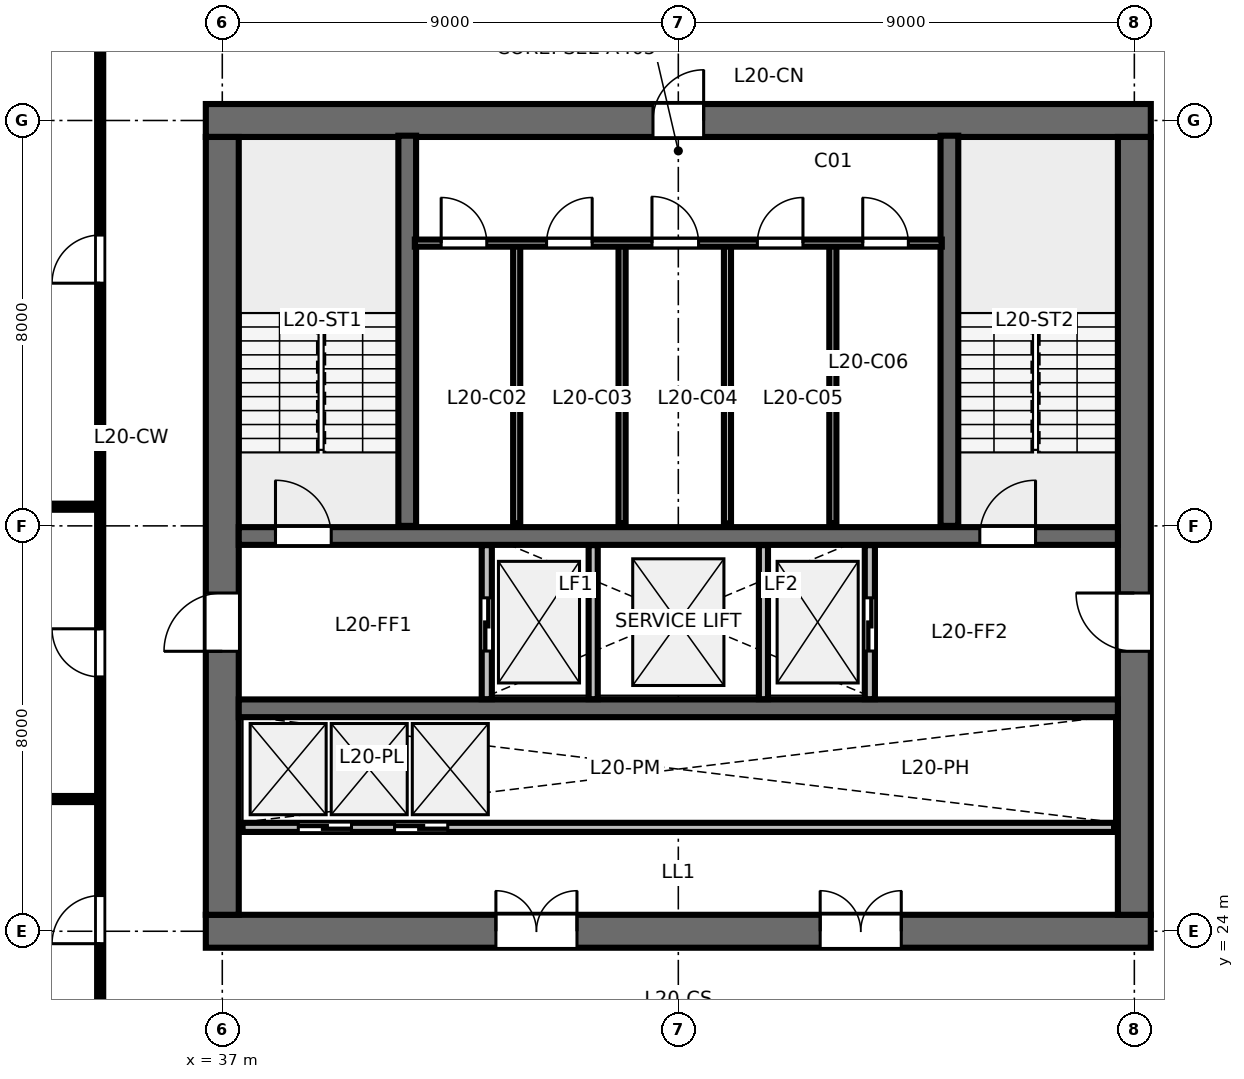
"""IFC4 building model, lengths in metres.
Left out: names, types, materials, properties, quantities, classifications, styles, units other than length and angle.
Written with IfcOpenShell. Run it as: python <this file> out.ifc"""

import sys

from ifc_helpers import new_model, si_unit, direction, frame, frame_2d, origin, place, context, subcontext, project, spatial, rectangle, extrude, element, fill, save


model = new_model("IFC4")
c1 = context("Model", 3, precision=1e-05, world=origin(), true_north=direction((0.0, 1.0)))
c2 = subcontext(c1, "Body", "Model", "MODEL_VIEW")
j1 = project(units=[si_unit("LENGTHUNIT", "METRE"), si_unit("PLANEANGLEUNIT", "RADIAN")], contexts=[c1])
p1 = place(None, origin())
s1 = spatial("IfcSite", under=j1, at=p1, CompositionType="ELEMENT")
p2 = place(p1, origin())
s2 = spatial("IfcBuilding", under=s1, at=p2, CompositionType="ELEMENT")
p3 = place(p2, frame((0.0, 0.0, 78.4)))
s3 = spatial("IfcBuildingStorey", under=s2, at=p3, CompositionType="ELEMENT", Elevation=78.4)
p4 = place(p3, frame((36.675, 24.0, 0.0), z_axis=(0.0, 0.0, 1.0), x_axis=(1.0, 0.0, 0.0)))
e1 = element("IfcWall", 1, at=p4, inside=s3, PredefinedType="SHEAR", context=c2, shape_type="SweptSolid", body=[
    extrude(rectangle(XDim=18.65, YDim=0.65, at=frame_2d((9.325, 0.0))), origin(), (0.0, 0.0, 1.0), 3.36),
])
p5 = place(p4, frame((5.725, 0.0, 0.0)))
e2 = element("IfcOpeningElement", 2, at=p5, cuts=e1, PredefinedType="OPENING", context=c2, shape_type="SweptSolid", body=[
    extrude(rectangle(XDim=1.6, YDim=2.15, at=frame_2d((0.8, 1.075))), frame((0.0, 0.335, 0.0), z_axis=(0.0, -1.0, 0.0), x_axis=(1.0, 0.0, 0.0)), (0.0, 0.0, 1.0), 0.67),
])
p6 = place(p4, frame((12.125, 0.0, 0.0)))
e3 = element("IfcOpeningElement", 3, at=p6, cuts=e1, PredefinedType="OPENING", context=c2, shape_type="SweptSolid", body=[
    extrude(rectangle(XDim=1.6, YDim=2.15, at=frame_2d((0.8, 1.075))), frame((0.0, 0.335, 0.0), z_axis=(0.0, -1.0, 0.0), x_axis=(1.0, 0.0, 0.0)), (0.0, 0.0, 1.0), 0.67),
])
p7 = place(p3, frame((36.675, 40.0, 0.0), z_axis=(0.0, 0.0, 1.0), x_axis=(1.0, 0.0, 0.0)))
e4 = element("IfcWall", 4, at=p7, inside=s3, PredefinedType="SHEAR", context=c2, shape_type="SweptSolid", body=[
    extrude(rectangle(XDim=18.65, YDim=0.65, at=frame_2d((9.325, 0.0))), origin(), (0.0, 0.0, 1.0), 3.36),
])
p8 = place(p7, frame((8.825, 0.0, 0.0)))
e5 = element("IfcOpeningElement", 5, at=p8, cuts=e4, PredefinedType="OPENING", context=c2, shape_type="SweptSolid", body=[
    extrude(rectangle(XDim=1.0, YDim=2.15, at=frame_2d((0.5, 1.075))), frame((0.0, 0.335, 0.0), z_axis=(0.0, -1.0, 0.0), x_axis=(1.0, 0.0, 0.0)), (0.0, 0.0, 1.0), 0.67),
])
p9 = place(p3, frame((37.0, 24.325, 0.0), z_axis=(0.0, 0.0, 1.0), x_axis=(0.0, 1.0, 0.0)))
e6 = element("IfcWall", 6, at=p9, inside=s3, PredefinedType="SHEAR", context=c2, shape_type="SweptSolid", body=[
    extrude(rectangle(XDim=15.35, YDim=0.65, at=frame_2d((7.675, 0.0))), origin(), (0.0, 0.0, 1.0), 3.36),
])
p10 = place(p9, frame((5.2, 0.0, 0.0)))
e7 = element("IfcOpeningElement", 7, at=p10, cuts=e6, PredefinedType="OPENING", context=c2, shape_type="SweptSolid", body=[
    extrude(rectangle(XDim=1.15, YDim=2.15, at=frame_2d((0.575, 1.075))), frame((0.0, 0.335, 0.0), z_axis=(0.0, -1.0, 0.0), x_axis=(1.0, 0.0, 0.0)), (0.0, 0.0, 1.0), 0.67),
])
p11 = place(p3, frame((55.0, 24.325, 0.0), z_axis=(0.0, 0.0, 1.0), x_axis=(0.0, 1.0, 0.0)))
e8 = element("IfcWall", 8, at=p11, inside=s3, PredefinedType="SHEAR", context=c2, shape_type="SweptSolid", body=[
    extrude(rectangle(XDim=15.35, YDim=0.65, at=frame_2d((7.675, 0.0))), origin(), (0.0, 0.0, 1.0), 3.36),
])
p12 = place(p11, frame((5.2, 0.0, 0.0)))
e9 = element("IfcOpeningElement", 9, at=p12, cuts=e8, PredefinedType="OPENING", context=c2, shape_type="SweptSolid", body=[
    extrude(rectangle(XDim=1.15, YDim=2.15, at=frame_2d((0.575, 1.075))), frame((0.0, 0.335, 0.0), z_axis=(0.0, -1.0, 0.0), x_axis=(1.0, 0.0, 0.0)), (0.0, 0.0, 1.0), 0.67),
])
p13 = place(p3, frame((37.325, 31.8, 0.0), z_axis=(0.0, 0.0, 1.0), x_axis=(1.0, 0.0, 0.0)))
e10 = element("IfcWall", 10, at=p13, inside=s3, PredefinedType="SHEAR", context=c2, shape_type="SweptSolid", body=[
    extrude(rectangle(XDim=17.35, YDim=0.35, at=frame_2d((8.675, 0.0))), origin(), (0.0, 0.0, 1.0), 3.36),
])
p14 = place(p13, frame((0.725, 0.0, 0.0)))
e11 = element("IfcOpeningElement", 11, at=p14, cuts=e10, PredefinedType="OPENING", context=c2, shape_type="SweptSolid", body=[
    extrude(rectangle(XDim=1.1, YDim=2.15, at=frame_2d((0.55, 1.075))), frame((0.0, 0.185, 0.0), z_axis=(0.0, -1.0, 0.0), x_axis=(1.0, 0.0, 0.0)), (0.0, 0.0, 1.0), 0.37),
])
p15 = place(p13, frame((14.625, 0.0, 0.0)))
e12 = element("IfcOpeningElement", 12, at=p15, cuts=e10, PredefinedType="OPENING", context=c2, shape_type="SweptSolid", body=[
    extrude(rectangle(XDim=1.1, YDim=2.15, at=frame_2d((0.55, 1.075))), frame((0.0, 0.185, 0.0), z_axis=(0.0, -1.0, 0.0), x_axis=(1.0, 0.0, 0.0)), (0.0, 0.0, 1.0), 0.37),
])
p16 = place(p3, frame((37.325, 28.4, 0.0), z_axis=(0.0, 0.0, 1.0), x_axis=(1.0, 0.0, 0.0)))
e13 = element("IfcWall", 13, at=p16, inside=s3, PredefinedType="SHEAR", context=c2, shape_type="SweptSolid", body=[
    extrude(rectangle(XDim=17.35, YDim=0.35, at=frame_2d((8.675, 0.0))), origin(), (0.0, 0.0, 1.0), 3.36),
])
for number, where, z_axis, x_axis in (
    (14, (40.65, 32.0, 0.0), (0.0, 0.0, 1.0), (0.0, 1.0, 0.0)),
    (15, (51.35, 32.0, 0.0), (0.0, 0.0, 1.0), (0.0, 1.0, 0.0)),
):
    element("IfcWall", number, at=place(p3, frame(where, z_axis=z_axis, x_axis=x_axis)), inside=s3, PredefinedType="SHEAR", context=c2, shape_type="SweptSolid", body=[
        extrude(rectangle(XDim=7.7, YDim=0.35, at=frame_2d((3.85, 0.0))), origin(), (0.0, 0.0, 1.0), 3.6),
    ])
for number, where, z_axis, x_axis in (
    (16, (42.81, 32.05, 0.0), (0.0, 0.0, 1.0), (0.0, 1.0, 0.0)),
    (17, (44.89, 32.05, 0.0), (0.0, 0.0, 1.0), (0.0, 1.0, 0.0)),
    (18, (46.97, 32.05, 0.0), (0.0, 0.0, 1.0), (0.0, 1.0, 0.0)),
    (19, (49.05, 32.05, 0.0), (0.0, 0.0, 1.0), (0.0, 1.0, 0.0)),
):
    element("IfcWall", number, at=place(p3, frame(where, z_axis=z_axis, x_axis=x_axis)), inside=s3, PredefinedType="PARTITIONING", context=c2, shape_type="SweptSolid", body=[
        extrude(rectangle(XDim=5.5, YDim=0.14, at=frame_2d((2.75, 0.0))), origin(), (0.0, 0.0, 1.0), 3.36),
    ])
p17 = place(p3, frame((40.8, 37.58, 0.0), z_axis=(0.0, 0.0, 1.0), x_axis=(1.0, 0.0, 0.0)))
e20 = element("IfcWall", 20, at=p17, inside=s3, PredefinedType="PARTITIONING", context=c2, shape_type="SweptSolid", body=[
    extrude(rectangle(XDim=10.4, YDim=0.14, at=frame_2d((5.2, 0.0))), origin(), (0.0, 0.0, 1.0), 3.36),
])
p18 = place(p17, frame((0.52, 0.0, 0.0)))
e21 = element("IfcOpeningElement", 21, at=p18, cuts=e20, PredefinedType="OPENING", context=c2, shape_type="SweptSolid", body=[
    extrude(rectangle(XDim=0.9, YDim=2.15, at=frame_2d((0.45, 1.075))), frame((0.0, 0.08, 0.0), z_axis=(0.0, -1.0, 0.0), x_axis=(1.0, 0.0, 0.0)), (0.0, 0.0, 1.0), 0.16),
])
p19 = place(p17, frame((2.6, 0.0, 0.0)))
e22 = element("IfcOpeningElement", 22, at=p19, cuts=e20, PredefinedType="OPENING", context=c2, shape_type="SweptSolid", body=[
    extrude(rectangle(XDim=0.9, YDim=2.15, at=frame_2d((0.45, 1.075))), frame((0.0, 0.08, 0.0), z_axis=(0.0, -1.0, 0.0), x_axis=(1.0, 0.0, 0.0)), (0.0, 0.0, 1.0), 0.16),
])
p20 = place(p17, frame((4.68, 0.0, 0.0)))
e23 = element("IfcOpeningElement", 23, at=p20, cuts=e20, PredefinedType="OPENING", context=c2, shape_type="SweptSolid", body=[
    extrude(rectangle(XDim=0.92, YDim=2.15, at=frame_2d((0.46, 1.075))), frame((0.0, 0.08, 0.0), z_axis=(0.0, -1.0, 0.0), x_axis=(1.0, 0.0, 0.0)), (0.0, 0.0, 1.0), 0.16),
])
p21 = place(p17, frame((6.76, 0.0, 0.0)))
e24 = element("IfcOpeningElement", 24, at=p21, cuts=e20, PredefinedType="OPENING", context=c2, shape_type="SweptSolid", body=[
    extrude(rectangle(XDim=0.9, YDim=2.15, at=frame_2d((0.45, 1.075))), frame((0.0, 0.08, 0.0), z_axis=(0.0, -1.0, 0.0), x_axis=(1.0, 0.0, 0.0)), (0.0, 0.0, 1.0), 0.16),
])
p22 = place(p17, frame((8.84, 0.0, 0.0)))
e25 = element("IfcOpeningElement", 25, at=p22, cuts=e20, PredefinedType="OPENING", context=c2, shape_type="SweptSolid", body=[
    extrude(rectangle(XDim=0.9, YDim=2.15, at=frame_2d((0.45, 1.075))), frame((0.0, 0.08, 0.0), z_axis=(0.0, -1.0, 0.0), x_axis=(1.0, 0.0, 0.0)), (0.0, 0.0, 1.0), 0.16),
])
p23 = place(p3, frame((42.22, 28.58, 0.0), z_axis=(0.0, 0.0, 1.0), x_axis=(0.0, 1.0, 0.0)))
e26 = element("IfcWall", 26, at=p23, inside=s3, PredefinedType="PARTITIONING", context=c2, shape_type="SweptSolid", body=[
    extrude(rectangle(XDim=3.04, YDim=0.2, at=frame_2d((1.52, 0.0))), origin(), (0.0, 0.0, 1.0), 3.36),
])
p24 = place(p23, frame((0.95, 0.0, 0.0)))
e27 = element("IfcOpeningElement", 27, at=p24, cuts=e26, PredefinedType="OPENING", context=c2, shape_type="SweptSolid", body=[
    extrude(rectangle(XDim=1.05, YDim=2.15, at=frame_2d((0.525, 1.075))), frame((0.0, 0.11, 0.0), z_axis=(0.0, -1.0, 0.0), x_axis=(1.0, 0.0, 0.0)), (0.0, 0.0, 1.0), 0.22),
])
p25 = place(p3, frame((49.78, 28.58, 0.0), z_axis=(0.0, 0.0, 1.0), x_axis=(0.0, 1.0, 0.0)))
e28 = element("IfcWall", 28, at=p25, inside=s3, PredefinedType="PARTITIONING", context=c2, shape_type="SweptSolid", body=[
    extrude(rectangle(XDim=3.04, YDim=0.2, at=frame_2d((1.52, 0.0))), origin(), (0.0, 0.0, 1.0), 3.36),
])
p26 = place(p25, frame((0.95, 0.0, 0.0)))
e29 = element("IfcOpeningElement", 29, at=p26, cuts=e28, PredefinedType="OPENING", context=c2, shape_type="SweptSolid", body=[
    extrude(rectangle(XDim=1.05, YDim=2.15, at=frame_2d((0.525, 1.075))), frame((0.0, 0.11, 0.0), z_axis=(0.0, -1.0, 0.0), x_axis=(1.0, 0.0, 0.0)), (0.0, 0.0, 1.0), 0.22),
])
for number, where, z_axis, x_axis in (
    (30, (44.32, 28.58, 0.0), (0.0, 0.0, 1.0), (0.0, 1.0, 0.0)),
    (31, (47.68, 28.58, 0.0), (0.0, 0.0, 1.0), (0.0, 1.0, 0.0)),
):
    element("IfcWall", number, at=place(p3, frame(where, z_axis=z_axis, x_axis=x_axis)), inside=s3, PredefinedType="PARTITIONING", context=c2, shape_type="SweptSolid", body=[
        extrude(rectangle(XDim=3.04, YDim=0.18, at=frame_2d((1.52, 0.0))), origin(), (0.0, 0.0, 1.0), 3.36),
    ])
p27 = place(p3, frame((37.4, 26.05, 0.0), z_axis=(0.0, 0.0, 1.0), x_axis=(1.0, 0.0, 0.0)))
e32 = element("IfcWall", 32, at=p27, inside=s3, PredefinedType="PARTITIONING", context=c2, shape_type="SweptSolid", body=[
    extrude(rectangle(XDim=17.2, YDim=0.18, at=frame_2d((8.6, 0.0))), origin(), (0.0, 0.0, 1.0), 3.36),
])
p28 = place(p27, frame((1.1, 0.0, 0.0)))
e33 = element("IfcOpeningElement", 33, at=p28, cuts=e32, PredefinedType="OPENING", context=c2, shape_type="SweptSolid", body=[
    extrude(rectangle(XDim=1.05, YDim=2.15, at=frame_2d((0.525, 1.075))), frame((0.0, 0.1, 0.0), z_axis=(0.0, -1.0, 0.0), x_axis=(1.0, 0.0, 0.0)), (0.0, 0.0, 1.0), 0.2),
])
p29 = place(p27, frame((3.0, 0.0, 0.0)))
e34 = element("IfcOpeningElement", 34, at=p29, cuts=e32, PredefinedType="OPENING", context=c2, shape_type="SweptSolid", body=[
    extrude(rectangle(XDim=1.05, YDim=2.15, at=frame_2d((0.525, 1.075))), frame((0.0, 0.1, 0.0), z_axis=(0.0, -1.0, 0.0), x_axis=(1.0, 0.0, 0.0)), (0.0, 0.0, 1.0), 0.2),
])
p30 = place(p3, frame((34.59, 26.61, 0.0), z_axis=(0.0, 0.0, 1.0), x_axis=(-1.0, 0.0, 0.0)))
e35 = element("IfcWall", 35, at=p30, inside=s3, PredefinedType="PARTITIONING", context=c2, shape_type="SweptSolid", body=[
    extrude(rectangle(XDim=13.41, YDim=0.12, at=frame_2d((6.705, 0.0))), origin(), (0.0, 0.0, 1.0), 2.64),
])
p31 = place(p30, frame((1.4, 0.0, 0.0)))
e36 = element("IfcOpeningElement", 36, at=p31, cuts=e35, PredefinedType="OPENING", context=c2, shape_type="SweptSolid", body=[
    extrude(rectangle(XDim=0.9, YDim=2.15, at=frame_2d((0.45, 1.075))), frame((0.0, 0.07, 0.0), z_axis=(0.0, -1.0, 0.0), x_axis=(1.0, 0.0, 0.0)), (0.0, 0.0, 1.0), 0.14),
])
p32 = place(p3, frame((34.59, 32.378, 0.0), z_axis=(0.0, 0.0, 1.0), x_axis=(-1.0, 0.0, 0.0)))
e37 = element("IfcWall", 37, at=p32, inside=s3, PredefinedType="PARTITIONING", context=c2, shape_type="SweptSolid", body=[
    extrude(rectangle(XDim=13.41, YDim=0.12, at=frame_2d((6.705, 0.0))), origin(), (0.0, 0.0, 1.0), 2.64),
])
p33 = place(p32, frame((1.4, 0.0, 0.0)))
e38 = element("IfcOpeningElement", 38, at=p33, cuts=e37, PredefinedType="OPENING", context=c2, shape_type="SweptSolid", body=[
    extrude(rectangle(XDim=0.9, YDim=2.15, at=frame_2d((0.45, 1.075))), frame((0.0, 0.07, 0.0), z_axis=(0.0, -1.0, 0.0), x_axis=(1.0, 0.0, 0.0)), (0.0, 0.0, 1.0), 0.14),
])
p34 = place(p3, frame((34.59, 21.65, 0.0), z_axis=(0.0, 0.0, 1.0), x_axis=(0.0, 1.0, 0.0)))
e39 = element("IfcWall", 39, at=p34, inside=s3, PredefinedType="PARTITIONING", context=c2, shape_type="SweptSolid", body=[
    extrude(rectangle(XDim=20.7, YDim=0.12, at=frame_2d((10.35, 0.0))), origin(), (0.0, 0.0, 1.0), 2.64),
])
p35 = place(p34, frame((2.105, 0.0, 0.0)))
e40 = element("IfcOpeningElement", 40, at=p35, cuts=e39, PredefinedType="OPENING", context=c2, shape_type="SweptSolid", body=[
    extrude(rectangle(XDim=0.95, YDim=2.15, at=frame_2d((0.475, 1.075))), frame((0.0, 0.07, 0.0), z_axis=(0.0, -1.0, 0.0), x_axis=(1.0, 0.0, 0.0)), (0.0, 0.0, 1.0), 0.14),
])
p36 = place(p34, frame((7.369, 0.0, 0.0)))
e41 = element("IfcOpeningElement", 41, at=p36, cuts=e39, PredefinedType="OPENING", context=c2, shape_type="SweptSolid", body=[
    extrude(rectangle(XDim=0.95, YDim=2.15, at=frame_2d((0.475, 1.075))), frame((0.0, 0.07, 0.0), z_axis=(0.0, -1.0, 0.0), x_axis=(1.0, 0.0, 0.0)), (0.0, 0.0, 1.0), 0.14),
])
p37 = place(p34, frame((15.139, 0.0, 0.0)))
e42 = element("IfcOpeningElement", 42, at=p37, cuts=e39, PredefinedType="OPENING", context=c2, shape_type="SweptSolid", body=[
    extrude(rectangle(XDim=0.95, YDim=2.15, at=frame_2d((0.475, 1.075))), frame((0.0, 0.07, 0.0), z_axis=(0.0, -1.0, 0.0), x_axis=(1.0, 0.0, 0.0)), (0.0, 0.0, 1.0), 0.14),
])
p38 = place(p14, origin())
e43 = element("IfcDoor", 43, at=p38, inside=s3, OperationType="SINGLE_SWING_LEFT", PredefinedType="DOOR", context=c2, shape_type="SweptSolid", body=[
    extrude(rectangle(XDim=1.1, YDim=2.15, at=frame_2d((0.55, 1.075))), frame((0.0, 0.025, 0.0), z_axis=(0.0, -1.0, 0.0), x_axis=(1.0, 0.0, 0.0)), (0.0, 0.0, 1.0), 0.05),
])
fill(e11, e43)
p39 = place(p15, origin())
e44 = element("IfcDoor", 44, at=p39, inside=s3, OperationType="SINGLE_SWING_RIGHT", PredefinedType="DOOR", context=c2, shape_type="SweptSolid", body=[
    extrude(rectangle(XDim=1.1, YDim=2.15, at=frame_2d((0.55, 1.075))), frame((0.0, 0.025, 0.0), z_axis=(0.0, -1.0, 0.0), x_axis=(1.0, 0.0, 0.0)), (0.0, 0.0, 1.0), 0.05),
])
fill(e12, e44)
p40 = place(p8, origin())
e45 = element("IfcDoor", 45, at=p40, inside=s3, OperationType="SINGLE_SWING_RIGHT", PredefinedType="DOOR", context=c2, shape_type="SweptSolid", body=[
    extrude(rectangle(XDim=1.0, YDim=2.15, at=frame_2d((0.5, 1.075))), frame((0.0, 0.025, 0.0), z_axis=(0.0, -1.0, 0.0), x_axis=(1.0, 0.0, 0.0)), (0.0, 0.0, 1.0), 0.05),
])
fill(e5, e45)
p41 = place(p10, origin())
e46 = element("IfcDoor", 46, at=p41, inside=s3, OperationType="SINGLE_SWING_LEFT", PredefinedType="DOOR", context=c2, shape_type="SweptSolid", body=[
    extrude(rectangle(XDim=1.15, YDim=2.15, at=frame_2d((0.575, 1.075))), frame((0.0, 0.025, 0.0), z_axis=(0.0, -1.0, 0.0), x_axis=(1.0, 0.0, 0.0)), (0.0, 0.0, 1.0), 0.05),
])
fill(e7, e46)
p42 = place(p12, origin())
e47 = element("IfcDoor", 47, at=p42, inside=s3, OperationType="SINGLE_SWING_RIGHT", PredefinedType="DOOR", context=c2, shape_type="SweptSolid", body=[
    extrude(rectangle(XDim=1.15, YDim=2.15, at=frame_2d((0.575, 1.075))), frame((0.0, 0.025, 0.0), z_axis=(0.0, -1.0, 0.0), x_axis=(1.0, 0.0, 0.0)), (0.0, 0.0, 1.0), 0.05),
])
fill(e9, e47)
p43 = place(p5, origin())
e48 = element("IfcDoor", 48, at=p43, inside=s3, OperationType="DOUBLE_DOOR_SINGLE_SWING", PredefinedType="DOOR", context=c2, shape_type="SweptSolid", body=[
    extrude(rectangle(XDim=1.6, YDim=2.15, at=frame_2d((0.8, 1.075))), frame((0.0, 0.025, 0.0), z_axis=(0.0, -1.0, 0.0), x_axis=(1.0, 0.0, 0.0)), (0.0, 0.0, 1.0), 0.05),
])
fill(e2, e48)
p44 = place(p6, origin())
e49 = element("IfcDoor", 49, at=p44, inside=s3, OperationType="DOUBLE_DOOR_SINGLE_SWING", PredefinedType="DOOR", context=c2, shape_type="SweptSolid", body=[
    extrude(rectangle(XDim=1.6, YDim=2.15, at=frame_2d((0.8, 1.075))), frame((0.0, 0.025, 0.0), z_axis=(0.0, -1.0, 0.0), x_axis=(1.0, 0.0, 0.0)), (0.0, 0.0, 1.0), 0.05),
])
fill(e3, e49)
p45 = place(p18, origin())
e50 = element("IfcDoor", 50, at=p45, inside=s3, OperationType="SINGLE_SWING_LEFT", PredefinedType="DOOR", context=c2, shape_type="SweptSolid", body=[
    extrude(rectangle(XDim=0.9, YDim=2.15, at=frame_2d((0.45, 1.075))), frame((0.0, 0.025, 0.0), z_axis=(0.0, -1.0, 0.0), x_axis=(1.0, 0.0, 0.0)), (0.0, 0.0, 1.0), 0.05),
])
fill(e21, e50)
p46 = place(p19, origin())
e51 = element("IfcDoor", 51, at=p46, inside=s3, OperationType="SINGLE_SWING_RIGHT", PredefinedType="DOOR", context=c2, shape_type="SweptSolid", body=[
    extrude(rectangle(XDim=0.9, YDim=2.15, at=frame_2d((0.45, 1.075))), frame((0.0, 0.025, 0.0), z_axis=(0.0, -1.0, 0.0), x_axis=(1.0, 0.0, 0.0)), (0.0, 0.0, 1.0), 0.05),
])
fill(e22, e51)
p47 = place(p20, origin())
e52 = element("IfcDoor", 52, at=p47, inside=s3, OperationType="SINGLE_SWING_LEFT", PredefinedType="DOOR", context=c2, shape_type="SweptSolid", body=[
    extrude(rectangle(XDim=0.92, YDim=2.15, at=frame_2d((0.46, 1.075))), frame((0.0, 0.025, 0.0), z_axis=(0.0, -1.0, 0.0), x_axis=(1.0, 0.0, 0.0)), (0.0, 0.0, 1.0), 0.05),
])
fill(e23, e52)
p48 = place(p21, origin())
e53 = element("IfcDoor", 53, at=p48, inside=s3, OperationType="SINGLE_SWING_RIGHT", PredefinedType="DOOR", context=c2, shape_type="SweptSolid", body=[
    extrude(rectangle(XDim=0.9, YDim=2.15, at=frame_2d((0.45, 1.075))), frame((0.0, 0.025, 0.0), z_axis=(0.0, -1.0, 0.0), x_axis=(1.0, 0.0, 0.0)), (0.0, 0.0, 1.0), 0.05),
])
fill(e24, e53)
p49 = place(p22, origin())
e54 = element("IfcDoor", 54, at=p49, inside=s3, OperationType="SINGLE_SWING_LEFT", PredefinedType="DOOR", context=c2, shape_type="SweptSolid", body=[
    extrude(rectangle(XDim=0.9, YDim=2.15, at=frame_2d((0.45, 1.075))), frame((0.0, 0.025, 0.0), z_axis=(0.0, -1.0, 0.0), x_axis=(1.0, 0.0, 0.0)), (0.0, 0.0, 1.0), 0.05),
])
fill(e25, e54)
p50 = place(p24, origin())
e55 = element("IfcDoor", 55, at=p50, inside=s3, OperationType="SLIDING_TO_LEFT", PredefinedType="DOOR", context=c2, shape_type="SweptSolid", body=[
    extrude(rectangle(XDim=1.05, YDim=2.15, at=frame_2d((0.525, 1.075))), frame((0.0, 0.025, 0.0), z_axis=(0.0, -1.0, 0.0), x_axis=(1.0, 0.0, 0.0)), (0.0, 0.0, 1.0), 0.05),
])
fill(e27, e55)
p51 = place(p26, origin())
e56 = element("IfcDoor", 56, at=p51, inside=s3, OperationType="SLIDING_TO_RIGHT", PredefinedType="DOOR", context=c2, shape_type="SweptSolid", body=[
    extrude(rectangle(XDim=1.05, YDim=2.15, at=frame_2d((0.525, 1.075))), frame((0.0, 0.025, 0.0), z_axis=(0.0, -1.0, 0.0), x_axis=(1.0, 0.0, 0.0)), (0.0, 0.0, 1.0), 0.05),
])
fill(e29, e56)
p52 = place(p28, origin())
e57 = element("IfcDoor", 57, at=p52, inside=s3, OperationType="SLIDING_TO_LEFT", PredefinedType="DOOR", context=c2, shape_type="SweptSolid", body=[
    extrude(rectangle(XDim=1.05, YDim=2.15, at=frame_2d((0.525, 1.075))), frame((0.0, 0.025, 0.0), z_axis=(0.0, -1.0, 0.0), x_axis=(1.0, 0.0, 0.0)), (0.0, 0.0, 1.0), 0.05),
])
fill(e33, e57)
p53 = place(p29, origin())
e58 = element("IfcDoor", 58, at=p53, inside=s3, OperationType="SLIDING_TO_RIGHT", PredefinedType="DOOR", context=c2, shape_type="SweptSolid", body=[
    extrude(rectangle(XDim=1.05, YDim=2.15, at=frame_2d((0.525, 1.075))), frame((0.0, 0.025, 0.0), z_axis=(0.0, -1.0, 0.0), x_axis=(1.0, 0.0, 0.0)), (0.0, 0.0, 1.0), 0.05),
])
fill(e34, e58)
p54 = place(p35, origin())
e59 = element("IfcDoor", 59, at=p54, inside=s3, OperationType="SINGLE_SWING_LEFT", PredefinedType="DOOR", context=c2, shape_type="SweptSolid", body=[
    extrude(rectangle(XDim=0.95, YDim=2.15, at=frame_2d((0.475, 1.075))), frame((0.0, 0.025, 0.0), z_axis=(0.0, -1.0, 0.0), x_axis=(1.0, 0.0, 0.0)), (0.0, 0.0, 1.0), 0.05),
])
fill(e40, e59)
p55 = place(p36, origin())
e60 = element("IfcDoor", 60, at=p55, inside=s3, OperationType="SINGLE_SWING_RIGHT", PredefinedType="DOOR", context=c2, shape_type="SweptSolid", body=[
    extrude(rectangle(XDim=0.95, YDim=2.15, at=frame_2d((0.475, 1.075))), frame((0.0, 0.025, 0.0), z_axis=(0.0, -1.0, 0.0), x_axis=(1.0, 0.0, 0.0)), (0.0, 0.0, 1.0), 0.05),
])
fill(e41, e60)
p56 = place(p37, origin())
e61 = element("IfcDoor", 61, at=p56, inside=s3, OperationType="SINGLE_SWING_LEFT", PredefinedType="DOOR", context=c2, shape_type="SweptSolid", body=[
    extrude(rectangle(XDim=0.95, YDim=2.15, at=frame_2d((0.475, 1.075))), frame((0.0, 0.025, 0.0), z_axis=(0.0, -1.0, 0.0), x_axis=(1.0, 0.0, 0.0)), (0.0, 0.0, 1.0), 0.05),
])
fill(e42, e61)
save(model, sys.argv[1])
